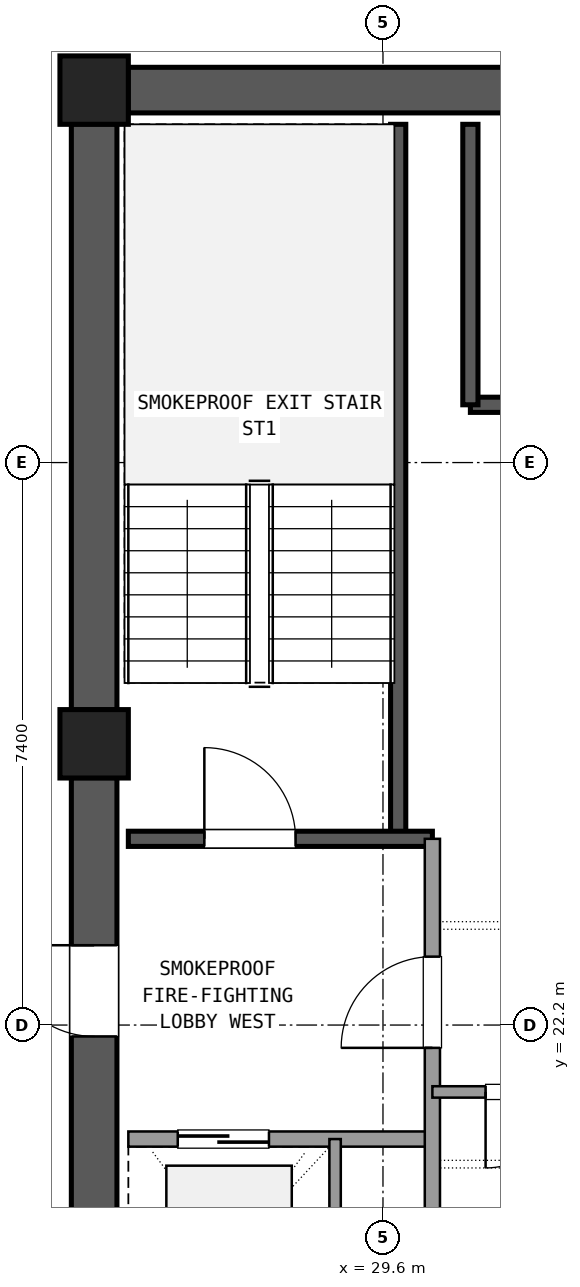
"""IFC4 building model, lengths in metres.
Left out: names, types, materials, properties, quantities, classifications, styles, units other than length and angle.
Written with IfcOpenShell. Run it as: python <this file> out.ifc"""

import sys

from ifc_helpers import new_model, si_unit, direction, frame, frame_2d, origin, origin_2d, place, context, subcontext, project, spatial, rectangle, extrude, element, fill, save


model = new_model("IFC4")
c1 = context("Model", 3, precision=1e-05, world=origin(), true_north=direction((0.0, 1.0)))
c2 = subcontext(c1, "Body", "Model", "MODEL_VIEW")
j1 = project(units=[si_unit("LENGTHUNIT", "METRE"), si_unit("PLANEANGLEUNIT", "RADIAN")], contexts=[c1])
p1 = place(None, origin())
s1 = spatial("IfcSite", under=j1, at=p1, CompositionType="ELEMENT")
p2 = place(p1, origin())
s2 = spatial("IfcBuilding", under=s1, at=p2, CompositionType="ELEMENT")
p3 = place(p2, frame((0.0, 0.0, 207.18)))
s3 = spatial("IfcBuildingStorey", under=s2, at=p3, CompositionType="ELEMENT", Elevation=207.18)
for number, where, z_axis, x_axis in (
    (1, (25.8, 34.5, 0.0), (0.0, 0.0, 1.0), (1.0, 0.0, 0.0)),
    (2, (25.8, 25.9, 0.0), (0.0, 0.0, 1.0), (1.0, 0.0, 0.0)),
):
    element("IfcColumn", number, at=place(p3, frame(where, z_axis=z_axis, x_axis=x_axis)), inside=s3, PredefinedType="COLUMN", context=c2, shape_type="SweptSolid", body=[
        extrude(rectangle(XDim=0.9, YDim=0.9, at=origin_2d()), origin(), (0.0, 0.0, 1.0), 3.6),
    ])
p4 = place(p3, frame((36.555, 34.5, 0.0), z_axis=(0.0, 0.0, 1.0), x_axis=(-1.0, 0.0, 0.0)))
e3 = element("IfcWall", 3, at=p4, inside=s3, PredefinedType="SHEAR", context=c2, shape_type="SweptSolid", body=[
    extrude(rectangle(XDim=10.31, YDim=0.6, at=frame_2d((5.155, 0.0))), origin(), (0.0, 0.0, 1.0), 3.32),
])
p5 = place(p4, frame((4.155, 0.0, 0.0)))
e4 = element("IfcOpeningElement", 4, at=p5, cuts=e3, PredefinedType="OPENING", context=c2, shape_type="SweptSolid", body=[
    extrude(rectangle(XDim=1.2, YDim=2.15, at=frame_2d((0.6, 1.075))), frame((0.0, 0.31, 0.0), z_axis=(0.0, -1.0, 0.0), x_axis=(1.0, 0.0, 0.0)), (0.0, 0.0, 1.0), 0.62),
])
p6 = place(p3, frame((25.8, 34.055, 0.0), z_axis=(0.0, 0.0, 1.0), x_axis=(0.0, -1.0, 0.0)))
e5 = element("IfcWall", 5, at=p6, inside=s3, PredefinedType="SHEAR", context=c2, shape_type="SweptSolid", body=[
    extrude(rectangle(XDim=7.71, YDim=0.6, at=frame_2d((3.855, 0.0))), origin(), (0.0, 0.0, 1.0), 3.32),
])
p7 = place(p3, frame((25.8, 25.455, 0.0), z_axis=(0.0, 0.0, 1.0), x_axis=(0.0, -1.0, 0.0)))
e6 = element("IfcWall", 6, at=p7, inside=s3, PredefinedType="SHEAR", context=c2, shape_type="SweptSolid", body=[
    extrude(rectangle(XDim=7.71, YDim=0.6, at=frame_2d((3.855, 0.0))), origin(), (0.0, 0.0, 1.0), 3.32),
])
p8 = place(p7, frame((2.205, 0.0, 0.0)))
e7 = element("IfcOpeningElement", 7, at=p8, cuts=e6, PredefinedType="OPENING", context=c2, shape_type="SweptSolid", body=[
    extrude(rectangle(XDim=1.2, YDim=2.15, at=frame_2d((0.6, 1.075))), frame((0.0, 0.31, 0.0), z_axis=(0.0, -1.0, 0.0), x_axis=(1.0, 0.0, 0.0)), (0.0, 0.0, 1.0), 0.62),
])
p9 = place(p3, frame((29.8, 24.65, 0.0), z_axis=(0.0, 0.0, 1.0), x_axis=(0.0, 1.0, 0.0)))
e8 = element("IfcWall", 8, at=p9, inside=s3, PredefinedType="SHEAR", context=c2, shape_type="SweptSolid", body=[
    extrude(rectangle(XDim=9.4, YDim=0.2, at=frame_2d((4.7, 0.0))), origin(), (0.0, 0.0, 1.0), 3.32),
])
p10 = place(p3, frame((26.25, 24.65, 0.0), z_axis=(0.0, 0.0, 1.0), x_axis=(1.0, 0.0, 0.0)))
e9 = element("IfcWall", 9, at=p10, inside=s3, PredefinedType="SHEAR", context=c2, shape_type="SweptSolid", body=[
    extrude(rectangle(XDim=4.0, YDim=0.2, at=frame_2d((2.0, 0.0))), origin(), (0.0, 0.0, 1.0), 3.32),
])
p11 = place(p10, frame((1.0, 0.0, 0.0)))
e10 = element("IfcOpeningElement", 10, at=p11, cuts=e9, PredefinedType="OPENING", context=c2, shape_type="SweptSolid", body=[
    extrude(rectangle(XDim=1.2, YDim=2.15, at=frame_2d((0.6, 1.075))), frame((0.0, 0.11, 0.0), z_axis=(0.0, -1.0, 0.0), x_axis=(1.0, 0.0, 0.0)), (0.0, 0.0, 1.0), 0.22),
])
p12 = place(p3, frame((30.75, 30.36, 0.0), z_axis=(0.0, 0.0, 1.0), x_axis=(1.0, 0.0, 0.0)))
e11 = element("IfcWall", 11, at=p12, inside=s3, PredefinedType="SHEAR", context=c2, shape_type="SweptSolid", body=[
    extrude(rectangle(XDim=9.5, YDim=0.2, at=frame_2d((4.75, 0.0))), origin(), (0.0, 0.0, 1.0), 3.32),
])
p13 = place(p3, frame((30.75, 30.36, 0.0), z_axis=(0.0, 0.0, 1.0), x_axis=(0.0, 1.0, 0.0)))
e12 = element("IfcWall", 12, at=p13, inside=s3, PredefinedType="SHEAR", context=c2, shape_type="SweptSolid", body=[
    extrude(rectangle(XDim=3.69, YDim=0.2, at=frame_2d((1.845, 0.0))), origin(), (0.0, 0.0, 1.0), 3.32),
])
p14 = place(p3, frame((26.25, 20.7, 0.0), z_axis=(0.0, 0.0, 1.0), x_axis=(1.0, 0.0, 0.0)))
e13 = element("IfcWall", 13, at=p14, inside=s3, PredefinedType="SOLIDWALL", context=c2, shape_type="SweptSolid", body=[
    extrude(rectangle(XDim=4.0, YDim=0.2, at=frame_2d((2.0, 0.0))), origin(), (0.0, 0.0, 1.0), 2.61),
])
p15 = place(p14, frame((0.65, 0.0, 0.0)))
e14 = element("IfcOpeningElement", 14, at=p15, cuts=e13, PredefinedType="OPENING", context=c2, shape_type="SweptSolid", body=[
    extrude(rectangle(XDim=1.2, YDim=2.15, at=frame_2d((0.6, 1.075))), frame((0.0, 0.11, 0.0), z_axis=(0.0, -1.0, 0.0), x_axis=(1.0, 0.0, 0.0)), (0.0, 0.0, 1.0), 0.22),
])
p16 = place(p3, frame((30.25, 17.75, 0.0), z_axis=(0.0, 0.0, 1.0), x_axis=(0.0, 1.0, 0.0)))
e15 = element("IfcWall", 15, at=p16, inside=s3, PredefinedType="SOLIDWALL", context=c2, shape_type="SweptSolid", body=[
    extrude(rectangle(XDim=6.9, YDim=0.2, at=frame_2d((3.45, 0.0))), origin(), (0.0, 0.0, 1.0), 2.61),
])
p17 = place(p16, frame((4.15, 0.0, 0.0)))
e16 = element("IfcOpeningElement", 16, at=p17, cuts=e15, PredefinedType="OPENING", context=c2, shape_type="SweptSolid", body=[
    extrude(rectangle(XDim=1.2, YDim=2.15, at=frame_2d((0.6, 1.075))), frame((0.0, 0.11, 0.0), z_axis=(0.0, -1.0, 0.0), x_axis=(1.0, 0.0, 0.0)), (0.0, 0.0, 1.0), 0.22),
])
p18 = place(p3, frame((28.97, 17.75, 0.0), z_axis=(0.0, 0.0, 1.0), x_axis=(0.0, 1.0, 0.0)))
e17 = element("IfcWall", 17, at=p18, inside=s3, PredefinedType="PARTITIONING", context=c2, shape_type="SweptSolid", body=[
    extrude(rectangle(XDim=2.95, YDim=0.15, at=frame_2d((1.475, 0.0))), origin(), (0.0, 0.0, 1.0), 2.61),
])
p19 = place(p3, frame((30.25, 21.32, 0.0), z_axis=(0.0, 0.0, 1.0), x_axis=(1.0, 0.0, 0.0)))
e18 = element("IfcWall", 18, at=p19, inside=s3, PredefinedType="PARTITIONING", context=c2, shape_type="SweptSolid", body=[
    extrude(rectangle(XDim=7.0, YDim=0.15, at=frame_2d((3.5, 0.0))), origin(), (0.0, 0.0, 1.0), 2.61),
])
p20 = place(p19, frame((0.7, 0.0, 0.0)))
e19 = element("IfcOpeningElement", 19, at=p20, cuts=e18, PredefinedType="OPENING", context=c2, shape_type="SweptSolid", body=[
    extrude(rectangle(XDim=1.0, YDim=2.15, at=frame_2d((0.5, 1.075))), frame((0.0, 0.085, 0.0), z_axis=(0.0, -1.0, 0.0), x_axis=(1.0, 0.0, 0.0)), (0.0, 0.0, 1.0), 0.17),
])
p21 = place(p19, frame((4.85, 0.0, 0.0)))
e20 = element("IfcOpeningElement", 20, at=p21, cuts=e18, PredefinedType="OPENING", context=c2, shape_type="SweptSolid", body=[
    extrude(rectangle(XDim=1.0, YDim=2.15, at=frame_2d((0.5, 1.075))), frame((0.0, 0.085, 0.0), z_axis=(0.0, -1.0, 0.0), x_axis=(1.0, 0.0, 0.0)), (0.0, 0.0, 1.0), 0.17),
])
p22 = place(p11, origin())
e21 = element("IfcDoor", 21, at=p22, inside=s3, OperationType="SINGLE_SWING_LEFT", PredefinedType="DOOR", context=c2, shape_type="SweptSolid", body=[
    extrude(rectangle(XDim=1.2, YDim=2.15, at=frame_2d((0.6, 1.075))), frame((0.0, 0.025, 0.0), z_axis=(0.0, -1.0, 0.0), x_axis=(1.0, 0.0, 0.0)), (0.0, 0.0, 1.0), 0.05),
])
fill(e10, e21)
p23 = place(p15, origin())
e22 = element("IfcDoor", 22, at=p23, inside=s3, OperationType="SLIDING_TO_LEFT", PredefinedType="DOOR", context=c2, shape_type="SweptSolid", body=[
    extrude(rectangle(XDim=1.2, YDim=2.15, at=frame_2d((0.6, 1.075))), frame((0.0, 0.025, 0.0), z_axis=(0.0, -1.0, 0.0), x_axis=(1.0, 0.0, 0.0)), (0.0, 0.0, 1.0), 0.05),
])
fill(e14, e22)
p24 = place(p17, origin())
e23 = element("IfcDoor", 23, at=p24, inside=s3, OperationType="SINGLE_SWING_LEFT", PredefinedType="DOOR", context=c2, shape_type="SweptSolid", body=[
    extrude(rectangle(XDim=1.2, YDim=2.15, at=frame_2d((0.6, 1.075))), frame((0.0, 0.025, 0.0), z_axis=(0.0, -1.0, 0.0), x_axis=(1.0, 0.0, 0.0)), (0.0, 0.0, 1.0), 0.05),
])
fill(e16, e23)
p25 = place(p8, frame((1.2, 0.0, 0.0), z_axis=(0.0, 0.0, 1.0), x_axis=(-1.0, 0.0, 0.0)))
e24 = element("IfcDoor", 24, at=p25, inside=s3, OperationType="SINGLE_SWING_LEFT", PredefinedType="DOOR", context=c2, shape_type="SweptSolid", body=[
    extrude(rectangle(XDim=1.2, YDim=2.15, at=frame_2d((0.6, 1.075))), frame((0.0, 0.025, 0.0), z_axis=(0.0, -1.0, 0.0), x_axis=(1.0, 0.0, 0.0)), (0.0, 0.0, 1.0), 0.05),
])
fill(e7, e24)
p26 = place(p20, frame((1.0, 0.0, 0.0), z_axis=(0.0, 0.0, 1.0), x_axis=(-1.0, 0.0, 0.0)))
e25 = element("IfcDoor", 25, at=p26, inside=s3, OperationType="SINGLE_SWING_LEFT", PredefinedType="DOOR", context=c2, shape_type="SweptSolid", body=[
    extrude(rectangle(XDim=1.0, YDim=2.15, at=frame_2d((0.5, 1.075))), frame((0.0, 0.025, 0.0), z_axis=(0.0, -1.0, 0.0), x_axis=(1.0, 0.0, 0.0)), (0.0, 0.0, 1.0), 0.05),
])
fill(e19, e25)
save(model, sys.argv[1])
